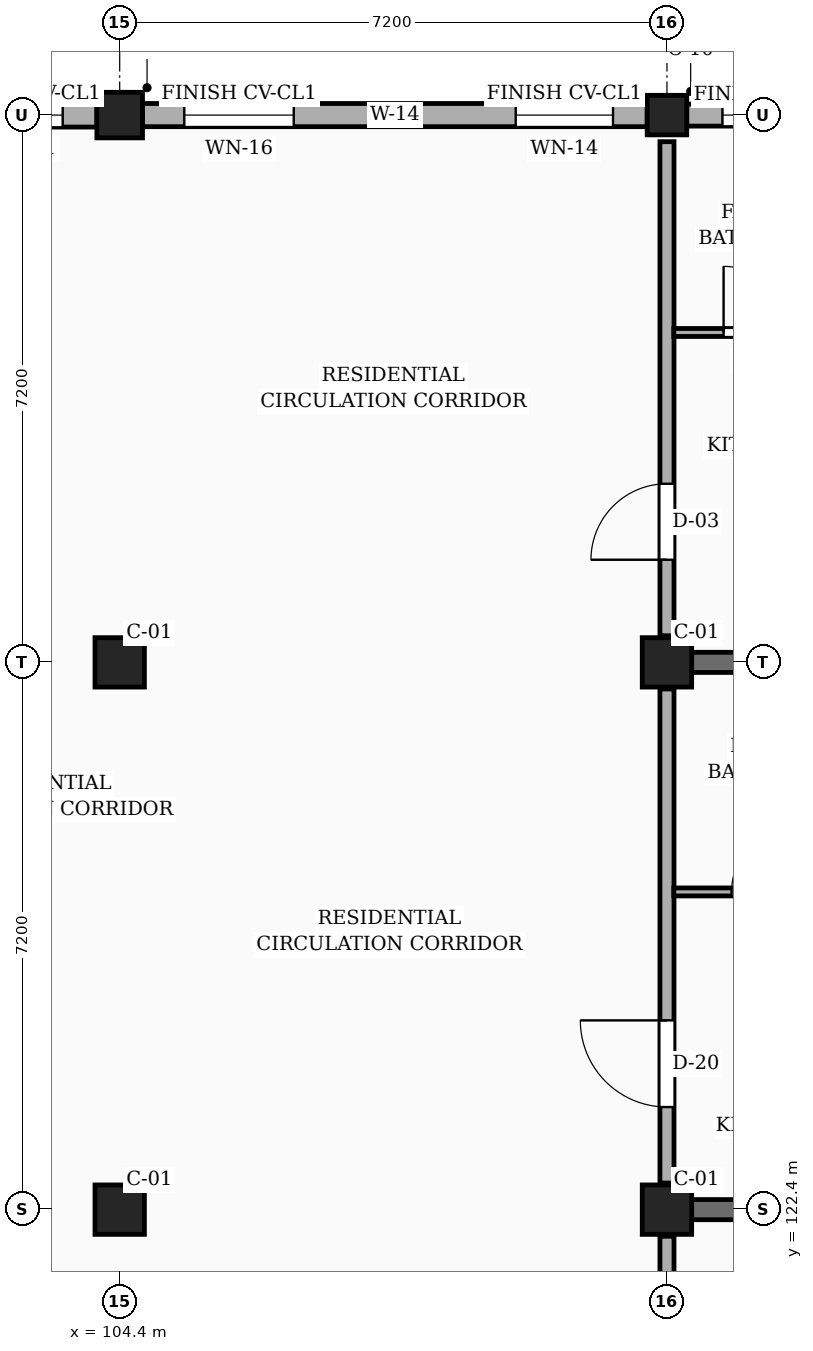
"""IFC4 building model, lengths in metres.
Left out: names, types, materials, properties, quantities, classifications, styles, units other than length and angle.
Written with IfcOpenShell. Run it as: python <this file> out.ifc"""

import sys

from ifc_helpers import new_model, si_unit, direction, frame, frame_2d, origin, origin_2d, place, context, subcontext, project, spatial, rectangle, circle, extrude, element, fill, save


model = new_model("IFC4")
c1 = context("Model", 3, precision=1e-05, world=origin(), true_north=direction((0.0, 1.0)))
c2 = subcontext(c1, "Body", "Model", "MODEL_VIEW")
j1 = project(units=[si_unit("LENGTHUNIT", "METRE"), si_unit("PLANEANGLEUNIT", "RADIAN")], contexts=[c1])
p1 = place(None, origin())
s1 = spatial("IfcSite", under=j1, at=p1, CompositionType="ELEMENT")
p2 = place(p1, origin())
s2 = spatial("IfcBuilding", under=s1, at=p2, CompositionType="ELEMENT")
p3 = place(p2, origin())
s3 = spatial("IfcBuildingStorey", under=s2, at=p3, CompositionType="ELEMENT", Elevation=0.0)
for number, where, z_axis, x_axis in (
    (1, (104.4, 122.4, 0.0), (0.0, 0.0, 1.0), (1.0, 0.0, 0.0)),
    (2, (104.4, 129.6, 0.0), (0.0, 0.0, 1.0), (1.0, 0.0, 0.0)),
):
    element("IfcColumn", number, at=place(p3, frame(where, z_axis=z_axis, x_axis=x_axis)), inside=s3, PredefinedType="COLUMN", context=c2, shape_type="SweptSolid", body=[
        extrude(rectangle(XDim=0.65, YDim=0.65, at=origin_2d()), origin(), (0.0, 0.0, 1.0), 4.5),
    ])
p4 = place(p3, frame((104.4, 136.8, 0.0), z_axis=(0.0, 0.0, 1.0), x_axis=(1.0, 0.0, 0.0)))
e3 = element("IfcColumn", 3, at=p4, inside=s3, PredefinedType="COLUMN", context=c2, shape_type="SweptSolid", body=[
    extrude(rectangle(XDim=0.6, YDim=0.6, at=origin_2d()), origin(), (0.0, 0.0, 1.0), 4.5),
])
for number, where, z_axis, x_axis in (
    (4, (111.6, 122.4, 0.0), (0.0, 0.0, 1.0), (1.0, 0.0, 0.0)),
    (5, (111.6, 129.6, 0.0), (0.0, 0.0, 1.0), (1.0, 0.0, 0.0)),
):
    element("IfcColumn", number, at=place(p3, frame(where, z_axis=z_axis, x_axis=x_axis)), inside=s3, PredefinedType="COLUMN", context=c2, shape_type="SweptSolid", body=[
        extrude(rectangle(XDim=0.65, YDim=0.65, at=origin_2d()), origin(), (0.0, 0.0, 1.0), 4.5),
    ])
p5 = place(p3, frame((111.6, 136.8, 0.0), z_axis=(0.0, 0.0, 1.0), x_axis=(1.0, 0.0, 0.0)))
e6 = element("IfcColumn", 6, at=p5, inside=s3, PredefinedType="COLUMN", context=c2, shape_type="SweptSolid", body=[
    extrude(circle(Radius=0.26, at=origin_2d()), origin(), (0.0, 0.0, 1.0), 4.5),
])
p6 = place(p3, frame((111.925, 122.4, 0.0), z_axis=(0.0, 0.0, 1.0), x_axis=(1.0, 0.0, 0.0)))
e7 = element("IfcWall", 7, at=p6, inside=s3, PredefinedType="SOLIDWALL", context=c2, shape_type="SweptSolid", body=[
    extrude(rectangle(XDim=6.575, YDim=0.265, at=frame_2d((3.288, 0.0))), origin(), (0.0, 0.0, 1.0), 3.54),
])
p7 = place(p3, frame((111.925, 129.6, 0.0), z_axis=(0.0, 0.0, 1.0), x_axis=(1.0, 0.0, 0.0)))
e8 = element("IfcWall", 8, at=p7, inside=s3, PredefinedType="SOLIDWALL", context=c2, shape_type="SweptSolid", body=[
    extrude(rectangle(XDim=6.615, YDim=0.265, at=frame_2d((3.308, 0.0))), origin(), (0.0, 0.0, 1.0), 3.54),
])
p8 = place(p3, frame((118.5, 136.8, 0.0), z_axis=(0.0, 0.0, 1.0), x_axis=(-1.0, 0.0, 0.0)))
e9 = element("IfcWall", 9, at=p8, inside=s3, PredefinedType="SOLIDWALL", context=c2, shape_type="SweptSolid", body=[
    extrude(rectangle(XDim=6.64, YDim=0.29, at=frame_2d((3.32, 0.0))), origin(), (0.0, 0.0, 1.0), 3.81),
])
p9 = place(p8, frame((1.79, 0.0, 0.78)))
e10 = element("IfcOpeningElement", 10, at=p9, cuts=e9, PredefinedType="OPENING", context=c2, shape_type="SweptSolid", body=[
    extrude(rectangle(XDim=1.12, YDim=1.26, at=frame_2d((0.56, 0.63))), frame((0.0, 0.155, 0.0), z_axis=(0.0, -1.0, 0.0), x_axis=(1.0, 0.0, 0.0)), (0.0, 0.0, 1.0), 0.31),
])
p10 = place(p8, frame((4.89, 0.0, 0.78)))
e11 = element("IfcOpeningElement", 11, at=p10, cuts=e9, PredefinedType="OPENING", context=c2, shape_type="SweptSolid", body=[
    extrude(rectangle(XDim=1.28, YDim=1.26, at=frame_2d((0.64, 0.63))), frame((0.0, 0.155, 0.0), z_axis=(0.0, -1.0, 0.0), x_axis=(1.0, 0.0, 0.0)), (0.0, 0.0, 1.0), 0.31),
])
p11 = place(p3, frame((111.34, 136.8, 0.0), z_axis=(0.0, 0.0, 1.0), x_axis=(-1.0, 0.0, 0.0)))
e12 = element("IfcWall", 12, at=p11, inside=s3, PredefinedType="SOLIDWALL", context=c2, shape_type="SweptSolid", body=[
    extrude(rectangle(XDim=6.64, YDim=0.305, at=frame_2d((3.32, 0.0))), origin(), (0.0, 0.0, 1.0), 3.81),
])
p12 = place(p11, frame((0.45, 0.0, 0.78)))
e13 = element("IfcOpeningElement", 13, at=p12, cuts=e12, PredefinedType="OPENING", context=c2, shape_type="SweptSolid", body=[
    extrude(rectangle(XDim=1.28, YDim=1.26, at=frame_2d((0.64, 0.63))), frame((0.0, 0.163, 0.0), z_axis=(0.0, -1.0, 0.0), x_axis=(1.0, 0.0, 0.0)), (0.0, 0.0, 1.0), 0.325),
])
p13 = place(p11, frame((4.65, 0.0, 0.78)))
e14 = element("IfcOpeningElement", 14, at=p13, cuts=e12, PredefinedType="OPENING", context=c2, shape_type="SweptSolid", body=[
    extrude(rectangle(XDim=1.44, YDim=1.26, at=frame_2d((0.72, 0.63))), frame((0.0, 0.163, 0.0), z_axis=(0.0, -1.0, 0.0), x_axis=(1.0, 0.0, 0.0)), (0.0, 0.0, 1.0), 0.325),
])
p14 = place(p3, frame((104.1, 136.8, 0.0), z_axis=(0.0, 0.0, 1.0), x_axis=(-1.0, 0.0, 0.0)))
e15 = element("IfcWall", 15, at=p14, inside=s3, PredefinedType="SOLIDWALL", context=c2, shape_type="SweptSolid", body=[
    extrude(rectangle(XDim=6.6, YDim=0.315, at=frame_2d((3.3, 0.0))), origin(), (0.0, 0.0, 1.0), 3.81),
])
p15 = place(p14, frame((0.45, 0.0, 0.78)))
e16 = element("IfcOpeningElement", 16, at=p15, cuts=e15, PredefinedType="OPENING", context=c2, shape_type="SweptSolid", body=[
    extrude(rectangle(XDim=1.04, YDim=1.26, at=frame_2d((0.52, 0.63))), frame((0.0, 0.167, 0.0), z_axis=(0.0, -1.0, 0.0), x_axis=(1.0, 0.0, 0.0)), (0.0, 0.0, 1.0), 0.335),
])
p16 = place(p14, frame((3.01, 0.0, 0.78)))
e17 = element("IfcOpeningElement", 17, at=p16, cuts=e15, PredefinedType="OPENING", context=c2, shape_type="SweptSolid", body=[
    extrude(rectangle(XDim=0.98, YDim=1.36, at=frame_2d((0.49, 0.68))), frame((0.0, 0.167, 0.0), z_axis=(0.0, -1.0, 0.0), x_axis=(1.0, 0.0, 0.0)), (0.0, 0.0, 1.0), 0.335),
])
p17 = place(p3, frame((111.6, 115.55, 0.0), z_axis=(0.0, 0.0, 1.0), x_axis=(0.0, 1.0, 0.0)))
e18 = element("IfcWall", 18, at=p17, inside=s3, PredefinedType="PARTITIONING", context=c2, shape_type="SweptSolid", body=[
    extrude(rectangle(XDim=6.5, YDim=0.185, at=frame_2d((3.25, 0.0))), origin(), (0.0, 0.0, 1.0), 3.49),
])
p18 = place(p17, frame((1.1, 0.0, 0.0)))
e19 = element("IfcOpeningElement", 19, at=p18, cuts=e18, PredefinedType="OPENING", context=c2, shape_type="SweptSolid", body=[
    extrude(rectangle(XDim=0.94, YDim=2.12, at=frame_2d((0.47, 1.06))), frame((0.0, 0.103, 0.0), z_axis=(0.0, -1.0, 0.0), x_axis=(1.0, 0.0, 0.0)), (0.0, 0.0, 1.0), 0.205),
])
p19 = place(p3, frame((111.6, 122.75, 0.0), z_axis=(0.0, 0.0, 1.0), x_axis=(0.0, 1.0, 0.0)))
e20 = element("IfcWall", 20, at=p19, inside=s3, PredefinedType="PARTITIONING", context=c2, shape_type="SweptSolid", body=[
    extrude(rectangle(XDim=6.5, YDim=0.185, at=frame_2d((3.25, 0.0))), origin(), (0.0, 0.0, 1.0), 3.49),
])
p20 = place(p19, frame((1.0, 0.0, 0.0)))
e21 = element("IfcOpeningElement", 21, at=p20, cuts=e20, PredefinedType="OPENING", context=c2, shape_type="SweptSolid", body=[
    extrude(rectangle(XDim=1.14, YDim=2.18, at=frame_2d((0.57, 1.09))), frame((0.0, 0.103, 0.0), z_axis=(0.0, -1.0, 0.0), x_axis=(1.0, 0.0, 0.0)), (0.0, 0.0, 1.0), 0.205),
])
p21 = place(p3, frame((111.6, 129.95, 0.0), z_axis=(0.0, 0.0, 1.0), x_axis=(0.0, 1.0, 0.0)))
e22 = element("IfcWall", 22, at=p21, inside=s3, PredefinedType="PARTITIONING", context=c2, shape_type="SweptSolid", body=[
    extrude(rectangle(XDim=6.5, YDim=0.185, at=frame_2d((3.25, 0.0))), origin(), (0.0, 0.0, 1.0), 3.49),
])
p22 = place(p21, frame((1.0, 0.0, 0.0)))
e23 = element("IfcOpeningElement", 23, at=p22, cuts=e22, PredefinedType="OPENING", context=c2, shape_type="SweptSolid", body=[
    extrude(rectangle(XDim=1.0, YDim=2.15, at=frame_2d((0.5, 1.075))), frame((0.0, 0.103, 0.0), z_axis=(0.0, -1.0, 0.0), x_axis=(1.0, 0.0, 0.0)), (0.0, 0.0, 1.0), 0.205),
])
p23 = place(p3, frame((111.69, 126.58, 0.0), z_axis=(0.0, 0.0, 1.0), x_axis=(1.0, 0.0, 0.0)))
e24 = element("IfcWall", 24, at=p23, inside=s3, PredefinedType="PARTITIONING", context=c2, shape_type="SweptSolid", body=[
    extrude(rectangle(XDim=2.42, YDim=0.105, at=frame_2d((1.21, 0.0))), origin(), (0.0, 0.0, 1.0), 3.675),
])
p24 = place(p23, frame((0.76, 0.0, 0.0)))
e25 = element("IfcOpeningElement", 25, at=p24, cuts=e24, PredefinedType="OPENING", context=c2, shape_type="SweptSolid", body=[
    extrude(rectangle(XDim=0.9, YDim=2.05, at=frame_2d((0.45, 1.025))), frame((0.0, 0.062, 0.0), z_axis=(0.0, -1.0, 0.0), x_axis=(1.0, 0.0, 0.0)), (0.0, 0.0, 1.0), 0.125),
])
p25 = place(p3, frame((111.69, 133.94, 0.0), z_axis=(0.0, 0.0, 1.0), x_axis=(1.0, 0.0, 0.0)))
e26 = element("IfcWall", 26, at=p25, inside=s3, PredefinedType="PARTITIONING", context=c2, shape_type="SweptSolid", body=[
    extrude(rectangle(XDim=2.18, YDim=0.105, at=frame_2d((1.09, 0.0))), origin(), (0.0, 0.0, 1.0), 3.675),
])
p26 = place(p25, frame((0.655, 0.0, 0.0)))
e27 = element("IfcOpeningElement", 27, at=p26, cuts=e26, PredefinedType="OPENING", context=c2, shape_type="SweptSolid", body=[
    extrude(rectangle(XDim=0.87, YDim=2.05, at=frame_2d((0.435, 1.025))), frame((0.0, 0.062, 0.0), z_axis=(0.0, -1.0, 0.0), x_axis=(1.0, 0.0, 0.0)), (0.0, 0.0, 1.0), 0.125),
])
p27 = place(p10, origin())
e28 = element("IfcWindow", 28, at=p27, inside=s3, PartitioningType="SINGLE_PANEL", PredefinedType="WINDOW", context=c2, shape_type="SweptSolid", body=[
    extrude(rectangle(XDim=1.28, YDim=1.26, at=frame_2d((0.64, 0.63))), frame((0.0, 0.03, 0.0), z_axis=(0.0, -1.0, 0.0), x_axis=(1.0, 0.0, 0.0)), (0.0, 0.0, 1.0), 0.06),
])
fill(e11, e28)
p28 = place(p12, origin())
e29 = element("IfcWindow", 29, at=p28, inside=s3, PartitioningType="SINGLE_PANEL", PredefinedType="WINDOW", context=c2, shape_type="SweptSolid", body=[
    extrude(rectangle(XDim=1.28, YDim=1.26, at=frame_2d((0.64, 0.63))), frame((0.0, 0.03, 0.0), z_axis=(0.0, -1.0, 0.0), x_axis=(1.0, 0.0, 0.0)), (0.0, 0.0, 1.0), 0.06),
])
fill(e13, e29)
p29 = place(p13, origin())
e30 = element("IfcWindow", 30, at=p29, inside=s3, PartitioningType="SINGLE_PANEL", PredefinedType="WINDOW", context=c2, shape_type="SweptSolid", body=[
    extrude(rectangle(XDim=1.44, YDim=1.26, at=frame_2d((0.72, 0.63))), frame((0.0, 0.03, 0.0), z_axis=(0.0, -1.0, 0.0), x_axis=(1.0, 0.0, 0.0)), (0.0, 0.0, 1.0), 0.06),
])
fill(e14, e30)
p30 = place(p15, origin())
e31 = element("IfcWindow", 31, at=p30, inside=s3, PartitioningType="SINGLE_PANEL", PredefinedType="WINDOW", context=c2, shape_type="SweptSolid", body=[
    extrude(rectangle(XDim=1.04, YDim=1.26, at=frame_2d((0.52, 0.63))), frame((0.0, 0.03, 0.0), z_axis=(0.0, -1.0, 0.0), x_axis=(1.0, 0.0, 0.0)), (0.0, 0.0, 1.0), 0.06),
])
fill(e16, e31)
p31 = place(p20, origin())
e32 = element("IfcDoor", 32, at=p31, inside=s3, OperationType="SINGLE_SWING_RIGHT", PredefinedType="DOOR", context=c2, shape_type="SweptSolid", body=[
    extrude(rectangle(XDim=1.14, YDim=2.18, at=frame_2d((0.57, 1.09))), frame((0.0, 0.025, 0.0), z_axis=(0.0, -1.0, 0.0), x_axis=(1.0, 0.0, 0.0)), (0.0, 0.0, 1.0), 0.05),
])
fill(e21, e32)
p32 = place(p22, origin())
e33 = element("IfcDoor", 33, at=p32, inside=s3, OperationType="SINGLE_SWING_LEFT", PredefinedType="DOOR", context=c2, shape_type="SweptSolid", body=[
    extrude(rectangle(XDim=1.0, YDim=2.15, at=frame_2d((0.5, 1.075))), frame((0.0, 0.025, 0.0), z_axis=(0.0, -1.0, 0.0), x_axis=(1.0, 0.0, 0.0)), (0.0, 0.0, 1.0), 0.05),
])
fill(e23, e33)
p33 = place(p24, origin())
e34 = element("IfcDoor", 34, at=p33, inside=s3, OperationType="SINGLE_SWING_RIGHT", PredefinedType="DOOR", context=c2, shape_type="SweptSolid", body=[
    extrude(rectangle(XDim=0.9, YDim=2.05, at=frame_2d((0.45, 1.025))), frame((0.0, 0.025, 0.0), z_axis=(0.0, -1.0, 0.0), x_axis=(1.0, 0.0, 0.0)), (0.0, 0.0, 1.0), 0.05),
])
fill(e25, e34)
p34 = place(p26, origin())
e35 = element("IfcDoor", 35, at=p34, inside=s3, OperationType="SINGLE_SWING_LEFT", PredefinedType="DOOR", context=c2, shape_type="SweptSolid", body=[
    extrude(rectangle(XDim=0.87, YDim=2.05, at=frame_2d((0.435, 1.025))), frame((0.0, 0.025, 0.0), z_axis=(0.0, -1.0, 0.0), x_axis=(1.0, 0.0, 0.0)), (0.0, 0.0, 1.0), 0.05),
])
fill(e27, e35)
save(model, sys.argv[1])
